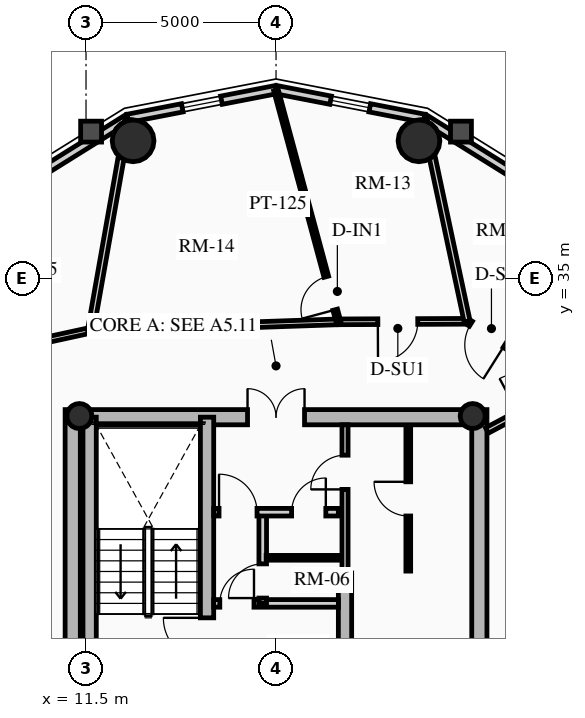
"""IFC4 building model, lengths in metres.
Left out: names, types, materials, properties, quantities, classifications, styles, units other than length and angle.
Written with IfcOpenShell. Run it as: python <this file> out.ifc"""

import sys

from ifc_helpers import new_model, si_unit, direction, frame, frame_2d, origin, origin_2d, place, context, subcontext, project, spatial, rectangle, circle, hollow_circle, extrude, source, transform, mapped, element, fill, save


model = new_model("IFC4")
c1 = context("Model", 3, precision=1e-05, world=origin(), true_north=direction((0.0, 1.0)))
c2 = subcontext(c1, "Body", "Model", "MODEL_VIEW")
j1 = project(units=[si_unit("LENGTHUNIT", "METRE"), si_unit("PLANEANGLEUNIT", "RADIAN")], contexts=[c1])
p1 = place(None, origin())
s1 = spatial("IfcSite", under=j1, at=p1, CompositionType="ELEMENT")
p2 = place(p1, origin())
s2 = spatial("IfcBuilding", under=s1, at=p2, CompositionType="ELEMENT")
p3 = place(p2, frame((0.0, 0.0, 211.21)))
s3 = spatial("IfcBuildingStorey", under=s2, at=p3, CompositionType="ELEMENT", Elevation=211.21)
for number, where, z_axis, x_axis in (
    (1, (11.15, 17.45, 0.0), (0.0, 0.0, 1.0), (0.0, 1.0, 0.0)),
    (2, (21.85, 17.45, 0.0), (0.0, 0.0, 1.0), (0.0, 1.0, 0.0)),
):
    element("IfcWall", number, at=place(p3, frame(where, z_axis=z_axis, x_axis=x_axis)), inside=s3, PredefinedType="SHEAR", context=c2, shape_type="SweptSolid", body=[
        extrude(rectangle(XDim=14.1, YDim=0.4, at=frame_2d((7.05, 0.0))), origin(), (0.0, 0.0, 1.0), 2.91),
    ])
p4 = place(p3, frame((11.15, 31.35, 0.0), z_axis=(0.0, 0.0, 1.0), x_axis=(1.0, 0.0, 0.0)))
e3 = element("IfcWall", 3, at=p4, inside=s3, PredefinedType="SHEAR", context=c2, shape_type="SweptSolid", body=[
    extrude(rectangle(XDim=10.7, YDim=0.4, at=frame_2d((5.35, 0.0))), origin(), (0.0, 0.0, 1.0), 2.91),
])
m1 = source(origin(), c2, "Body", "SweptSolid", [
    extrude(rectangle(XDim=1.5, YDim=2.02, at=frame_2d((0.75, 1.01))), frame((0.0, 0.21, 0.0), z_axis=(0.0, -1.0, 0.0), x_axis=(1.0, 0.0, 0.0)), (0.0, 0.0, 1.0), 0.42),
])
p5 = place(p4, frame((4.6, 0.0, 0.0)))
e4 = element("IfcOpeningElement", 4, at=p5, cuts=e3, PredefinedType="OPENING", context=c2, shape_type="MappedRepresentation", body=[
    mapped(m1, transform((0.0, 0.0, 0.0), x_axis=(1.0, 0.0, 0.0), y_axis=(0.0, 1.0, 0.0), z_axis=(0.0, 0.0, 1.0), scale=1.0)),
])
p6 = place(p3, frame((14.685, 17.65, 0.0), z_axis=(0.0, 0.0, 1.0), x_axis=(0.0, 1.0, 0.0)))
e5 = element("IfcWall", 5, at=p6, inside=s3, PredefinedType="SHEAR", context=c2, shape_type="SweptSolid", body=[
    extrude(rectangle(XDim=13.7, YDim=0.35, at=frame_2d((6.85, 0.0))), origin(), (0.0, 0.0, 1.0), 2.91),
])
m2 = source(origin(), c2, "Body", "SweptSolid", [
    extrude(rectangle(XDim=1.1, YDim=2.015, at=frame_2d((0.55, 1.007))), frame((0.0, 0.185, 0.0), z_axis=(0.0, -1.0, 0.0), x_axis=(1.0, 0.0, 0.0)), (0.0, 0.0, 1.0), 0.37),
])
p7 = place(p6, frame((4.85, 0.0, 0.0)))
e6 = element("IfcOpeningElement", 6, at=p7, cuts=e5, PredefinedType="OPENING", context=c2, shape_type="MappedRepresentation", body=[
    mapped(m2, transform((0.0, 0.0, 0.0), x_axis=(1.0, 0.0, 0.0), y_axis=(0.0, 1.0, 0.0), z_axis=(0.0, 0.0, 1.0), scale=1.0)),
])
p8 = place(p6, frame((0.625, 0.0, 0.0)))
e7 = element("IfcOpeningElement", 7, at=p8, cuts=e5, PredefinedType="OPENING", context=c2, shape_type="MappedRepresentation", body=[
    mapped(m2, transform((0.0, 0.0, 0.0), x_axis=(1.0, 0.0, 0.0), y_axis=(0.0, 1.0, 0.0), z_axis=(0.0, 0.0, 1.0), scale=1.0)),
])
p9 = place(p6, frame((2.625, 0.0, 0.0)))
e8 = element("IfcOpeningElement", 8, at=p9, cuts=e5, PredefinedType="OPENING", context=c2, shape_type="MappedRepresentation", body=[
    mapped(m2, transform((0.0, 0.0, 0.0), x_axis=(1.0, 0.0, 0.0), y_axis=(0.0, 1.0, 0.0), z_axis=(0.0, 0.0, 1.0), scale=1.0)),
])
m3 = source(origin(), c2, "Body", "SweptSolid", [
    extrude(rectangle(XDim=1.15, YDim=2.02, at=frame_2d((0.575, 1.01))), frame((0.0, 0.185, 0.0), z_axis=(0.0, -1.0, 0.0), x_axis=(1.0, 0.0, 0.0)), (0.0, 0.0, 1.0), 0.37),
])
p10 = place(p6, frame((7.27, 0.0, 0.0)))
e9 = element("IfcOpeningElement", 9, at=p10, cuts=e5, PredefinedType="OPENING", context=c2, shape_type="MappedRepresentation", body=[
    mapped(m3, transform((0.0, 0.0, 0.0), x_axis=(1.0, 0.0, 0.0), y_axis=(0.0, 1.0, 0.0), z_axis=(0.0, 0.0, 1.0), scale=1.0)),
])
p11 = place(p3, frame((18.315, 17.65, 0.0), z_axis=(0.0, 0.0, 1.0), x_axis=(0.0, 1.0, 0.0)))
e10 = element("IfcWall", 10, at=p11, inside=s3, PredefinedType="SHEAR", context=c2, shape_type="SweptSolid", body=[
    extrude(rectangle(XDim=9.6, YDim=0.35, at=frame_2d((4.8, 0.0))), origin(), (0.0, 0.0, 1.0), 2.91),
])
p12 = place(p11, frame((5.28, 0.0, 0.0)))
e11 = element("IfcOpeningElement", 11, at=p12, cuts=e10, PredefinedType="OPENING", context=c2, shape_type="MappedRepresentation", body=[
    mapped(m3, transform((0.0, 0.0, 0.0), x_axis=(1.0, 0.0, 0.0), y_axis=(0.0, 1.0, 0.0), z_axis=(0.0, 0.0, 1.0), scale=1.0)),
])
p13 = place(p3, frame((11.595, 24.655, 0.0), z_axis=(0.0, 0.0, 1.0), x_axis=(0.0, 1.0, 0.0)))
e12 = element("IfcWall", 12, at=p13, inside=s3, PredefinedType="SHEAR", context=c2, shape_type="SweptSolid", body=[
    extrude(rectangle(XDim=6.695, YDim=0.35, at=frame_2d((3.348, 0.0))), origin(), (0.0, 0.0, 1.0), 2.91),
])
for number, where, z_axis, x_axis in (
    (13, (11.325, 31.38, 0.0), (0.0, 0.0, 1.0), (1.0, 0.0, 0.0)),
    (14, (21.675, 31.38, 0.0), (0.0, 0.0, 1.0), (1.0, 0.0, 0.0)),
):
    element("IfcColumn", number, at=place(p3, frame(where, z_axis=z_axis, x_axis=x_axis)), inside=s3, PredefinedType="COLUMN", context=c2, shape_type="SweptSolid", body=[
        extrude(hollow_circle(Radius=0.33, WallThickness=0.025, at=origin_2d()), origin(), (0.0, 0.0, 1.0), 2.91),
    ])
for number, where, z_axis, x_axis in (
    (15, (20.261, 38.623, 0.0), (0.0, 0.0, 1.0), (1.0, 0.0, 0.0)),
    (16, (12.739, 38.623, 0.0), (0.0, 0.0, 1.0), (1.0, 0.0, 0.0)),
):
    element("IfcColumn", number, at=place(p3, frame(where, z_axis=z_axis, x_axis=x_axis)), inside=s3, PredefinedType="USERDEFINED", context=c2, shape_type="SweptSolid", body=[
        extrude(circle(Radius=0.55, at=origin_2d()), origin(), (0.0, 0.0, 1.0), 2.91),
    ])
p14 = place(p3, frame((20.403, 39.213, 0.0), z_axis=(0.0, 0.0, 1.0), x_axis=(0.848318713376, -0.529485939886, 0.0)))
e17 = element("IfcWall", 17, at=p14, inside=s3, PredefinedType="SOLIDWALL", context=c2, shape_type="SweptSolid", body=[
    extrude(rectangle(XDim=4.15, YDim=0.22, at=frame_2d((2.075, 0.0))), origin(), (0.0, 0.0, 1.0), 2.322),
])
p15 = place(p3, frame((16.5, 39.97, 0.0), z_axis=(0.0, 0.0, 1.0), x_axis=(0.981700307484, -0.190432419211, 0.0)))
e18 = element("IfcWall", 18, at=p15, inside=s3, PredefinedType="SOLIDWALL", context=c2, shape_type="SweptSolid", body=[
    extrude(rectangle(XDim=3.976, YDim=0.22, at=frame_2d((1.988, 0.0))), origin(), (0.0, 0.0, 1.0), 2.322),
])
m4 = source(origin(), c2, "Body", "SweptSolid", [
    extrude(rectangle(XDim=1.05, YDim=1.3, at=frame_2d((0.525, 0.65))), frame((0.0, 0.12, 0.0), z_axis=(0.0, -1.0, 0.0), x_axis=(1.0, 0.0, 0.0)), (0.0, 0.0, 1.0), 0.24),
])
p16 = place(p15, frame((1.463, 0.0, 0.65)))
e19 = element("IfcOpeningElement", 19, at=p16, cuts=e18, PredefinedType="OPENING", context=c2, shape_type="MappedRepresentation", body=[
    mapped(m4, transform((0.0, 0.0, 0.0), x_axis=(1.0, 0.0, 0.0), y_axis=(0.0, 1.0, 0.0), z_axis=(0.0, 0.0, 1.0), scale=1.0)),
])
p17 = place(p3, frame((12.597, 39.213, 0.0), z_axis=(0.0, 0.0, 1.0), x_axis=(0.981700307484, 0.190432419211, 0.0)))
e20 = element("IfcWall", 20, at=p17, inside=s3, PredefinedType="SOLIDWALL", context=c2, shape_type="SweptSolid", body=[
    extrude(rectangle(XDim=3.976, YDim=0.22, at=frame_2d((1.988, 0.0))), origin(), (0.0, 0.0, 1.0), 2.322),
])
p18 = place(p17, frame((1.463, 0.0, 0.65)))
e21 = element("IfcOpeningElement", 21, at=p18, cuts=e20, PredefinedType="OPENING", context=c2, shape_type="MappedRepresentation", body=[
    mapped(m4, transform((0.0, 0.0, 0.0), x_axis=(1.0, 0.0, 0.0), y_axis=(0.0, 1.0, 0.0), z_axis=(0.0, 0.0, 1.0), scale=1.0)),
])
p19 = place(p3, frame((9.076, 37.015, 0.0), z_axis=(0.0, 0.0, 1.0), x_axis=(0.848318713376, 0.529485939886, 0.0)))
e22 = element("IfcWall", 22, at=p19, inside=s3, PredefinedType="SOLIDWALL", context=c2, shape_type="SweptSolid", body=[
    extrude(rectangle(XDim=4.15, YDim=0.22, at=frame_2d((2.075, 0.0))), origin(), (0.0, 0.0, 1.0), 2.322),
])
p20 = place(p3, frame((14.86, 26.45, 0.0), z_axis=(0.0, 0.0, 1.0), x_axis=(1.0, 0.0, 0.0)))
e23 = element("IfcWall", 23, at=p20, inside=s3, PredefinedType="PARTITIONING", context=c2, shape_type="SweptSolid", body=[
    extrude(rectangle(XDim=3.28, YDim=0.2, at=frame_2d((1.64, 0.0))), origin(), (0.0, 0.0, 1.0), 2.685),
])
m5 = source(origin(), c2, "Body", "SweptSolid", [
    extrude(rectangle(XDim=0.9, YDim=2.005, at=frame_2d((0.45, 1.002))), frame((0.0, 0.11, 0.0), z_axis=(0.0, -1.0, 0.0), x_axis=(1.0, 0.0, 0.0)), (0.0, 0.0, 1.0), 0.22),
])
p21 = place(p20, frame((0.16, 0.0, 0.0)))
e24 = element("IfcOpeningElement", 24, at=p21, cuts=e23, PredefinedType="OPENING", context=c2, shape_type="MappedRepresentation", body=[
    mapped(m5, transform((0.0, 0.0, 0.0), x_axis=(1.0, 0.0, 0.0), y_axis=(0.0, 1.0, 0.0), z_axis=(0.0, 0.0, 1.0), scale=1.0)),
])
p22 = place(p3, frame((16.15, 26.45, 0.0), z_axis=(0.0, 0.0, 1.0), x_axis=(0.0, 1.0, 0.0)))
e25 = element("IfcWall", 25, at=p22, inside=s3, PredefinedType="PARTITIONING", context=c2, shape_type="SweptSolid", body=[
    extrude(rectangle(XDim=2.4, YDim=0.2, at=frame_2d((1.2, 0.0))), origin(), (0.0, 0.0, 1.0), 2.685),
])
p23 = place(p22, frame((0.14, 0.0, 0.0)))
e26 = element("IfcOpeningElement", 26, at=p23, cuts=e25, PredefinedType="OPENING", context=c2, shape_type="MappedRepresentation", body=[
    mapped(m5, transform((0.0, 0.0, 0.0), x_axis=(1.0, 0.0, 0.0), y_axis=(0.0, 1.0, 0.0), z_axis=(0.0, 0.0, 1.0), scale=1.0)),
])
p24 = place(p3, frame((14.86, 28.85, 0.0), z_axis=(0.0, 0.0, 1.0), x_axis=(1.0, 0.0, 0.0)))
e27 = element("IfcWall", 27, at=p24, inside=s3, PredefinedType="PARTITIONING", context=c2, shape_type="SweptSolid", body=[
    extrude(rectangle(XDim=3.28, YDim=0.2, at=frame_2d((1.64, 0.0))), origin(), (0.0, 0.0, 1.0), 2.685),
])
m6 = source(origin(), c2, "Body", "SweptSolid", [
    extrude(rectangle(XDim=1.0, YDim=2.015, at=frame_2d((0.5, 1.007))), frame((0.0, 0.11, 0.0), z_axis=(0.0, -1.0, 0.0), x_axis=(1.0, 0.0, 0.0)), (0.0, 0.0, 1.0), 0.22),
])
p25 = place(p24, frame((0.14, 0.0, 0.0)))
e28 = element("IfcOpeningElement", 28, at=p25, cuts=e27, PredefinedType="OPENING", context=c2, shape_type="MappedRepresentation", body=[
    mapped(m6, transform((0.0, 0.0, 0.0), x_axis=(1.0, 0.0, 0.0), y_axis=(0.0, 1.0, 0.0), z_axis=(0.0, 0.0, 1.0), scale=1.0)),
])
p26 = place(p24, frame((2.05, 0.0, 0.0)))
e29 = element("IfcOpeningElement", 29, at=p26, cuts=e27, PredefinedType="OPENING", context=c2, shape_type="MappedRepresentation", body=[
    mapped(m5, transform((0.0, 0.0, 0.0), x_axis=(1.0, 0.0, 0.0), y_axis=(0.0, 1.0, 0.0), z_axis=(0.0, 0.0, 1.0), scale=1.0)),
])
p27 = place(p3, frame((16.24, 27.65, 0.0), z_axis=(0.0, 0.0, 1.0), x_axis=(1.0, 0.0, 0.0)))
e30 = element("IfcWall", 30, at=p27, inside=s3, PredefinedType="PARTITIONING", context=c2, shape_type="SweptSolid", body=[
    extrude(rectangle(XDim=1.88, YDim=0.125, at=frame_2d((0.94, 0.0))), origin(), (0.0, 0.0, 1.0), 2.685),
])
p28 = place(p3, frame((18.315, 27.25, 0.0), z_axis=(0.0, 0.0, 1.0), x_axis=(0.0, 1.0, 0.0)))
e31 = element("IfcWall", 31, at=p28, inside=s3, PredefinedType="PARTITIONING", context=c2, shape_type="SweptSolid", body=[
    extrude(rectangle(XDim=3.9, YDim=0.16, at=frame_2d((1.95, 0.0))), origin(), (0.0, 0.0, 1.0), 2.685),
])
m7 = source(origin(), c2, "Body", "SweptSolid", [
    extrude(rectangle(XDim=0.9, YDim=2.005, at=frame_2d((0.45, 1.002))), frame((0.0, 0.09, 0.0), z_axis=(0.0, -1.0, 0.0), x_axis=(1.0, 0.0, 0.0)), (0.0, 0.0, 1.0), 0.18),
])
p29 = place(p28, frame((2.2, 0.0, 0.0)))
e32 = element("IfcOpeningElement", 32, at=p29, cuts=e31, PredefinedType="OPENING", context=c2, shape_type="MappedRepresentation", body=[
    mapped(m7, transform((0.0, 0.0, 0.0), x_axis=(1.0, 0.0, 0.0), y_axis=(0.0, 1.0, 0.0), z_axis=(0.0, 0.0, 1.0), scale=1.0)),
])
p30 = place(p3, frame((19.98, 27.3, 0.0), z_axis=(0.0, 0.0, 1.0), x_axis=(0.0, 1.0, 0.0)))
e33 = element("IfcWall", 33, at=p30, inside=s3, PredefinedType="PARTITIONING", context=c2, shape_type="SweptSolid", body=[
    extrude(rectangle(XDim=3.82, YDim=0.125, at=frame_2d((1.91, 0.0))), origin(), (0.0, 0.0, 1.0), 2.685),
])
m8 = source(origin(), c2, "Body", "SweptSolid", [
    extrude(rectangle(XDim=0.9, YDim=2.005, at=frame_2d((0.45, 1.002))), frame((0.0, 0.073, 0.0), z_axis=(0.0, -1.0, 0.0), x_axis=(1.0, 0.0, 0.0)), (0.0, 0.0, 1.0), 0.145),
])
p31 = place(p30, frame((1.45, 0.0, 0.0)))
e34 = element("IfcOpeningElement", 34, at=p31, cuts=e33, PredefinedType="OPENING", context=c2, shape_type="MappedRepresentation", body=[
    mapped(m8, transform((0.0, 0.0, 0.0), x_axis=(1.0, 0.0, 0.0), y_axis=(0.0, 1.0, 0.0), z_axis=(0.0, 0.0, 1.0), scale=1.0)),
])
p32 = place(p3, frame((22.877, 33.022, 0.0), z_axis=(0.0, 0.0, 1.0), x_axis=(-0.845895608855, 0.533348496689, 0.0)))
e35 = element("IfcWall", 35, at=p32, inside=s3, PredefinedType="PARTITIONING", context=c2, shape_type="SweptSolid", body=[
    extrude(rectangle(XDim=1.597, YDim=0.15, at=frame_2d((0.798, 0.0))), origin(), (0.0, 0.0, 1.0), 2.255),
])
m9 = source(origin(), c2, "Body", "SweptSolid", [
    extrude(rectangle(XDim=1.05, YDim=2.015, at=frame_2d((0.525, 1.007))), frame((0.0, 0.085, 0.0), z_axis=(0.0, -1.0, 0.0), x_axis=(1.0, 0.0, 0.0)), (0.0, 0.0, 1.0), 0.17),
])
p33 = place(p32, frame((0.427, 0.0, 0.0)))
e36 = element("IfcOpeningElement", 36, at=p33, cuts=e35, PredefinedType="OPENING", context=c2, shape_type="MappedRepresentation", body=[
    mapped(m9, transform((0.0, 0.0, 0.0), x_axis=(1.0, 0.0, 0.0), y_axis=(0.0, 1.0, 0.0), z_axis=(0.0, 0.0, 1.0), scale=1.0)),
])
p34 = place(p3, frame((21.527, 33.873, 0.0), z_axis=(0.0, 0.0, 1.0), x_axis=(-0.999991838845, -0.004040079574, 0.0)))
e37 = element("IfcWall", 37, at=p34, inside=s3, PredefinedType="PARTITIONING", context=c2, shape_type="SweptSolid", body=[
    extrude(rectangle(XDim=3.384, YDim=0.15, at=frame_2d((1.692, 0.0))), origin(), (0.0, 0.0, 1.0), 2.322),
])
p35 = place(p34, frame((1.298, 0.0, 0.0)))
e38 = element("IfcOpeningElement", 38, at=p35, cuts=e37, PredefinedType="OPENING", context=c2, shape_type="MappedRepresentation", body=[
    mapped(m9, transform((0.0, 0.0, 0.0), x_axis=(1.0, 0.0, 0.0), y_axis=(0.0, 1.0, 0.0), z_axis=(0.0, 0.0, 1.0), scale=1.0)),
])
p36 = place(p3, frame((18.143, 33.86, 0.0), z_axis=(0.0, 0.0, 1.0), x_axis=(-0.999419208319, -0.034077060363, 0.0)))
e39 = element("IfcWall", 39, at=p36, inside=s3, PredefinedType="PARTITIONING", context=c2, shape_type="SweptSolid", body=[
    extrude(rectangle(XDim=6.527, YDim=0.15, at=frame_2d((3.263, 0.0))), origin(), (0.0, 0.0, 1.0), 2.255),
])
p37 = place(p3, frame((11.62, 33.637, 0.0), z_axis=(0.0, 0.0, 1.0), x_axis=(-0.97702579435, -0.213121085711, 0.0)))
e40 = element("IfcWall", 40, at=p37, inside=s3, PredefinedType="PARTITIONING", context=c2, shape_type="SweptSolid", body=[
    extrude(rectangle(XDim=1.935, YDim=0.15, at=frame_2d((0.967, 0.0))), origin(), (0.0, 0.0, 1.0), 2.255),
])
p38 = place(p3, frame((21.527, 33.873, 0.0), z_axis=(0.0, 0.0, 1.0), x_axis=(-0.207772326864, 0.97817721308, 0.0)))
e41 = element("IfcWall", 41, at=p38, inside=s3, PredefinedType="PARTITIONING", context=c2, shape_type="SweptSolid", body=[
    extrude(rectangle(XDim=5.439, YDim=0.16, at=frame_2d((2.72, 0.0))), origin(), (0.0, 0.0, 1.0), 2.322),
])
p39 = place(p3, frame((11.62, 33.637, 0.0), z_axis=(0.0, 0.0, 1.0), x_axis=(0.174269061361, 0.984698072636, 0.0)))
e42 = element("IfcWall", 42, at=p39, inside=s3, PredefinedType="PARTITIONING", context=c2, shape_type="SweptSolid", body=[
    extrude(rectangle(XDim=5.643, YDim=0.16, at=frame_2d((2.822, 0.0))), origin(), (0.0, 0.0, 1.0), 2.322),
])
p40 = place(p3, frame((22.05, 31.0, 0.0), z_axis=(0.0, 0.0, 1.0), x_axis=(0.882791584709, 0.469764853908, 0.0)))
e43 = element("IfcWall", 43, at=p40, inside=s3, PredefinedType="PARTITIONING", context=c2, shape_type="SweptSolid", body=[
    extrude(rectangle(XDim=2.186, YDim=0.16, at=frame_2d((1.093, 0.0))), origin(), (0.0, 0.0, 1.0), 2.255),
])
m10 = source(origin(), c2, "Body", "SweptSolid", [
    extrude(rectangle(XDim=1.05, YDim=2.015, at=frame_2d((0.525, 1.007))), frame((0.0, 0.09, 0.0), z_axis=(0.0, -1.0, 0.0), x_axis=(1.0, 0.0, 0.0)), (0.0, 0.0, 1.0), 0.18),
])
p41 = place(p40, frame((0.936, 0.0, 0.0)))
e44 = element("IfcOpeningElement", 44, at=p41, cuts=e43, PredefinedType="OPENING", context=c2, shape_type="MappedRepresentation", body=[
    mapped(m10, transform((0.0, 0.0, 0.0), x_axis=(1.0, 0.0, 0.0), y_axis=(0.0, 1.0, 0.0), z_axis=(0.0, 0.0, 1.0), scale=1.0)),
])
p42 = place(p3, frame((18.143, 33.86, 0.0), z_axis=(0.0, 0.0, 1.0), x_axis=(-0.260434252895, 0.965491584592, 0.0)))
e45 = element("IfcWall", 45, at=p42, inside=s3, PredefinedType="PARTITIONING", context=c2, shape_type="SweptSolid", body=[
    extrude(rectangle(XDim=6.308, YDim=0.125, at=frame_2d((3.154, 0.0))), origin(), (0.0, 0.0, 1.0), 2.322),
])
p43 = place(p42, frame((0.33, 0.0, 0.0)))
e46 = element("IfcOpeningElement", 46, at=p43, cuts=e45, PredefinedType="OPENING", context=c2, shape_type="MappedRepresentation", body=[
    mapped(m8, transform((0.0, 0.0, 0.0), x_axis=(1.0, 0.0, 0.0), y_axis=(0.0, 1.0, 0.0), z_axis=(0.0, 0.0, 1.0), scale=1.0)),
])
m11 = source(origin(), c2, "Body", "SweptSolid", [
    extrude(rectangle(XDim=1.05, YDim=1.3, at=frame_2d((0.525, 0.65))), frame((0.0, 0.03, 0.0), z_axis=(0.0, -1.0, 0.0), x_axis=(1.0, 0.0, 0.0)), (0.0, 0.0, 1.0), 0.06),
])
p44 = place(p16, origin())
e47 = element("IfcWindow", 47, at=p44, inside=s3, PartitioningType="SINGLE_PANEL", PredefinedType="WINDOW", context=c2, shape_type="MappedRepresentation", body=[
    mapped(m11, transform((0.0, 0.0, 0.0), x_axis=(1.0, 0.0, 0.0), y_axis=(0.0, 1.0, 0.0), z_axis=(0.0, 0.0, 1.0), scale=1.0)),
])
fill(e19, e47)
p45 = place(p18, origin())
e48 = element("IfcWindow", 48, at=p45, inside=s3, PartitioningType="SINGLE_PANEL", PredefinedType="WINDOW", context=c2, shape_type="MappedRepresentation", body=[
    mapped(m11, transform((0.0, 0.0, 0.0), x_axis=(1.0, 0.0, 0.0), y_axis=(0.0, 1.0, 0.0), z_axis=(0.0, 0.0, 1.0), scale=1.0)),
])
fill(e21, e48)
m12 = source(origin(), c2, "Body", "SweptSolid", [
    extrude(rectangle(XDim=1.15, YDim=2.02, at=frame_2d((0.575, 1.01))), frame((0.0, 0.025, 0.0), z_axis=(0.0, -1.0, 0.0), x_axis=(1.0, 0.0, 0.0)), (0.0, 0.0, 1.0), 0.05),
])
p46 = place(p10, origin())
e49 = element("IfcDoor", 49, at=p46, inside=s3, OperationType="SINGLE_SWING_RIGHT", PredefinedType="DOOR", context=c2, shape_type="MappedRepresentation", body=[
    mapped(m12, transform((0.0, 0.0, 0.0), x_axis=(1.0, 0.0, 0.0), y_axis=(0.0, 1.0, 0.0), z_axis=(0.0, 0.0, 1.0), scale=1.0)),
])
fill(e9, e49)
m13 = source(origin(), c2, "Body", "SweptSolid", [
    extrude(rectangle(XDim=1.5, YDim=2.02, at=frame_2d((0.75, 1.01))), frame((0.0, 0.025, 0.0), z_axis=(0.0, -1.0, 0.0), x_axis=(1.0, 0.0, 0.0)), (0.0, 0.0, 1.0), 0.05),
])
p47 = place(p5, origin())
e50 = element("IfcDoor", 50, at=p47, inside=s3, OperationType="DOUBLE_DOOR_SINGLE_SWING", PredefinedType="DOOR", context=c2, shape_type="MappedRepresentation", body=[
    mapped(m13, transform((0.0, 0.0, 0.0), x_axis=(1.0, 0.0, 0.0), y_axis=(0.0, 1.0, 0.0), z_axis=(0.0, 0.0, 1.0), scale=1.0)),
])
fill(e4, e50)
m14 = source(origin(), c2, "Body", "SweptSolid", [
    extrude(rectangle(XDim=0.9, YDim=2.005, at=frame_2d((0.45, 1.002))), frame((0.0, 0.025, 0.0), z_axis=(0.0, -1.0, 0.0), x_axis=(1.0, 0.0, 0.0)), (0.0, 0.0, 1.0), 0.05),
])
p48 = place(p21, origin())
e51 = element("IfcDoor", 51, at=p48, inside=s3, OperationType="SINGLE_SWING_RIGHT", PredefinedType="DOOR", context=c2, shape_type="MappedRepresentation", body=[
    mapped(m14, transform((0.0, 0.0, 0.0), x_axis=(1.0, 0.0, 0.0), y_axis=(0.0, 1.0, 0.0), z_axis=(0.0, 0.0, 1.0), scale=1.0)),
])
fill(e24, e51)
m15 = source(origin(), c2, "Body", "SweptSolid", [
    extrude(rectangle(XDim=1.0, YDim=2.015, at=frame_2d((0.5, 1.007))), frame((0.0, 0.025, 0.0), z_axis=(0.0, -1.0, 0.0), x_axis=(1.0, 0.0, 0.0)), (0.0, 0.0, 1.0), 0.05),
])
p49 = place(p25, origin())
e52 = element("IfcDoor", 52, at=p49, inside=s3, OperationType="SINGLE_SWING_LEFT", PredefinedType="DOOR", context=c2, shape_type="MappedRepresentation", body=[
    mapped(m15, transform((0.0, 0.0, 0.0), x_axis=(1.0, 0.0, 0.0), y_axis=(0.0, 1.0, 0.0), z_axis=(0.0, 0.0, 1.0), scale=1.0)),
])
fill(e28, e52)
p50 = place(p23, origin())
e53 = element("IfcDoor", 53, at=p50, inside=s3, OperationType="SINGLE_SWING_LEFT", PredefinedType="DOOR", context=c2, shape_type="MappedRepresentation", body=[
    mapped(m14, transform((0.0, 0.0, 0.0), x_axis=(1.0, 0.0, 0.0), y_axis=(0.0, 1.0, 0.0), z_axis=(0.0, 0.0, 1.0), scale=1.0)),
])
fill(e26, e53)
p51 = place(p26, origin())
e54 = element("IfcDoor", 54, at=p51, inside=s3, OperationType="SINGLE_SWING_RIGHT", PredefinedType="DOOR", context=c2, shape_type="MappedRepresentation", body=[
    mapped(m14, transform((0.0, 0.0, 0.0), x_axis=(1.0, 0.0, 0.0), y_axis=(0.0, 1.0, 0.0), z_axis=(0.0, 0.0, 1.0), scale=1.0)),
])
fill(e29, e54)
p52 = place(p29, origin())
e55 = element("IfcDoor", 55, at=p52, inside=s3, OperationType="SINGLE_SWING_LEFT", PredefinedType="DOOR", context=c2, shape_type="MappedRepresentation", body=[
    mapped(m14, transform((0.0, 0.0, 0.0), x_axis=(1.0, 0.0, 0.0), y_axis=(0.0, 1.0, 0.0), z_axis=(0.0, 0.0, 1.0), scale=1.0)),
])
fill(e32, e55)
p53 = place(p31, origin())
e56 = element("IfcDoor", 56, at=p53, inside=s3, OperationType="SINGLE_SWING_RIGHT", PredefinedType="DOOR", context=c2, shape_type="MappedRepresentation", body=[
    mapped(m14, transform((0.0, 0.0, 0.0), x_axis=(1.0, 0.0, 0.0), y_axis=(0.0, 1.0, 0.0), z_axis=(0.0, 0.0, 1.0), scale=1.0)),
])
fill(e34, e56)
m16 = source(origin(), c2, "Body", "SweptSolid", [
    extrude(rectangle(XDim=1.05, YDim=2.015, at=frame_2d((0.525, 1.007))), frame((0.0, 0.025, 0.0), z_axis=(0.0, -1.0, 0.0), x_axis=(1.0, 0.0, 0.0)), (0.0, 0.0, 1.0), 0.05),
])
p54 = place(p33, origin())
e57 = element("IfcDoor", 57, at=p54, inside=s3, OperationType="SINGLE_SWING_LEFT", PredefinedType="DOOR", context=c2, shape_type="MappedRepresentation", body=[
    mapped(m16, transform((0.0, 0.0, 0.0), x_axis=(1.0, 0.0, 0.0), y_axis=(0.0, 1.0, 0.0), z_axis=(0.0, 0.0, 1.0), scale=1.0)),
])
fill(e36, e57)
p55 = place(p35, origin())
e58 = element("IfcDoor", 58, at=p55, inside=s3, OperationType="SINGLE_SWING_RIGHT", PredefinedType="DOOR", context=c2, shape_type="MappedRepresentation", body=[
    mapped(m16, transform((0.0, 0.0, 0.0), x_axis=(1.0, 0.0, 0.0), y_axis=(0.0, 1.0, 0.0), z_axis=(0.0, 0.0, 1.0), scale=1.0)),
])
fill(e38, e58)
p56 = place(p43, origin())
e59 = element("IfcDoor", 59, at=p56, inside=s3, OperationType="SINGLE_SWING_LEFT", PredefinedType="DOOR", context=c2, shape_type="MappedRepresentation", body=[
    mapped(m14, transform((0.0, 0.0, 0.0), x_axis=(1.0, 0.0, 0.0), y_axis=(0.0, 1.0, 0.0), z_axis=(0.0, 0.0, 1.0), scale=1.0)),
])
fill(e46, e59)
save(model, sys.argv[1])
